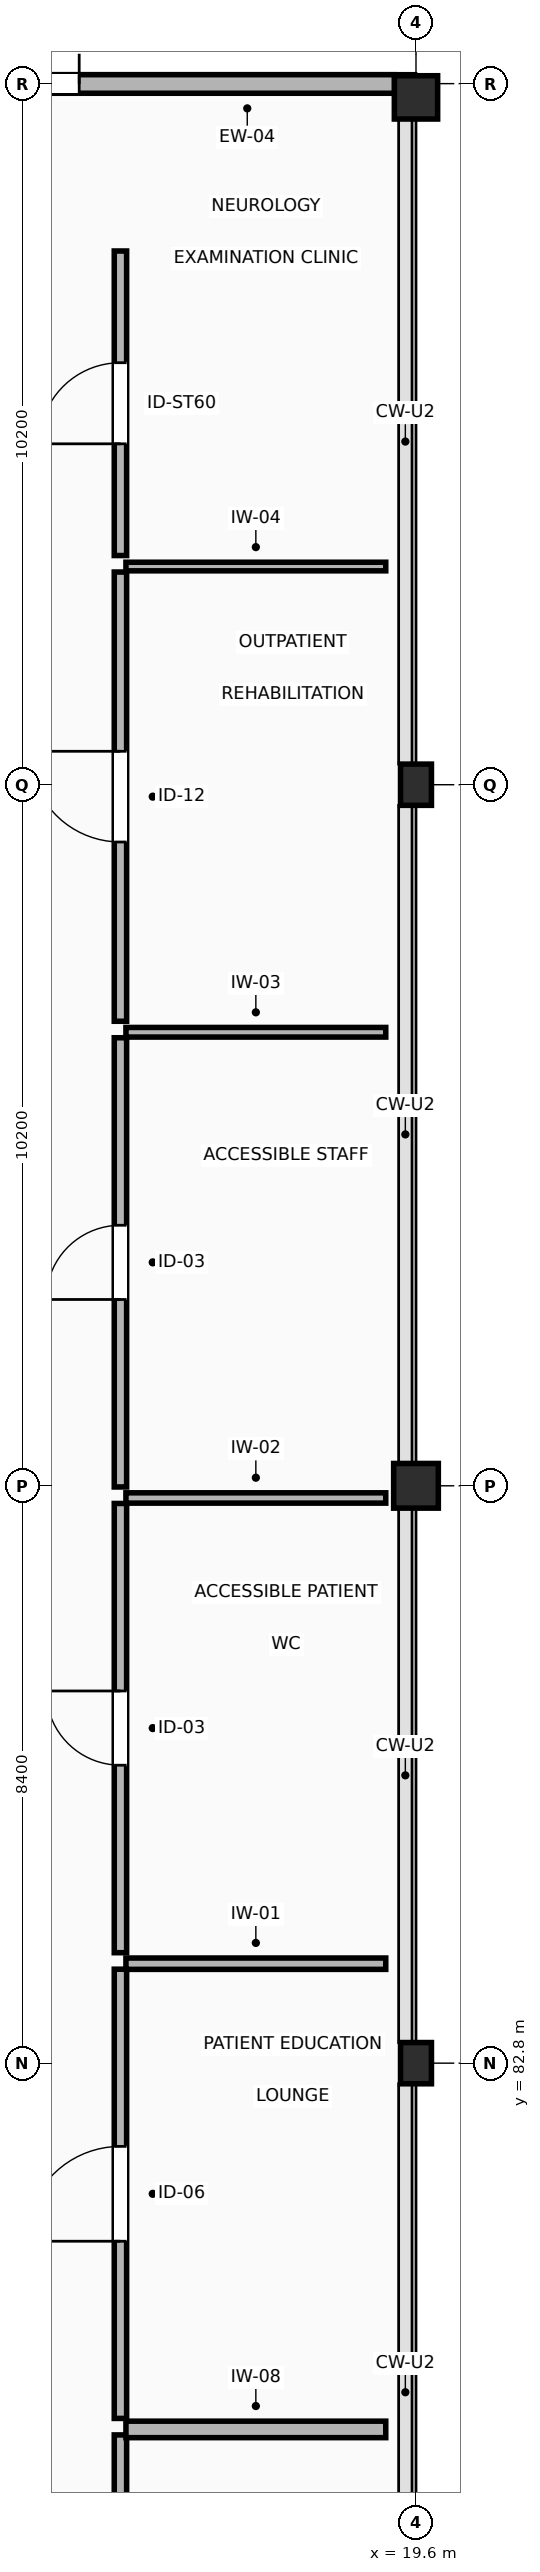
"""IFC4 building model, lengths in metres.
Left out: names, types, materials, properties, quantities, classifications, styles, units other than length and angle.
Written with IfcOpenShell. Run it as: python <this file> out.ifc"""

import sys

from ifc_helpers import new_model, si_unit, direction, frame, frame_2d, origin, origin_2d, place, context, subcontext, project, spatial, rectangle, extrude, element, fill, save


model = new_model("IFC4")
c1 = context("Model", 3, precision=1e-05, world=origin(), true_north=direction((0.0, 1.0)))
c2 = subcontext(c1, "Body", "Model", "MODEL_VIEW")
j1 = project(units=[si_unit("LENGTHUNIT", "METRE"), si_unit("PLANEANGLEUNIT", "RADIAN")], contexts=[c1])
p1 = place(None, origin())
s1 = spatial("IfcSite", under=j1, at=p1, CompositionType="ELEMENT")
p2 = place(p1, origin())
s2 = spatial("IfcBuilding", under=s1, at=p2, CompositionType="ELEMENT")
p3 = place(p2, origin())
s3 = spatial("IfcBuildingStorey", under=s2, at=p3, CompositionType="ELEMENT", Elevation=0.0)
p4 = place(p3, frame((19.6, 82.8, -1.75), z_axis=(0.0, 0.0, 1.0), x_axis=(1.0, 0.0, 0.0)))
e1 = element("IfcColumn", 1, at=p4, inside=s3, PredefinedType="COLUMN", context=c2, shape_type="SweptSolid", body=[
    extrude(rectangle(XDim=0.45, YDim=0.6, at=origin_2d()), origin(), (0.0, 0.0, 1.0), 7.15),
])
p5 = place(p3, frame((19.6, 91.2, -1.75), z_axis=(0.0, 0.0, 1.0), x_axis=(1.0, 0.0, 0.0)))
e2 = element("IfcColumn", 2, at=p5, inside=s3, PredefinedType="COLUMN", context=c2, shape_type="SweptSolid", body=[
    extrude(rectangle(XDim=0.65, YDim=0.65, at=origin_2d()), origin(), (0.0, 0.0, 1.0), 7.15),
])
p6 = place(p3, frame((19.6, 101.4, -1.75), z_axis=(0.0, 0.0, 1.0), x_axis=(1.0, 0.0, 0.0)))
e3 = element("IfcColumn", 3, at=p6, inside=s3, PredefinedType="COLUMN", context=c2, shape_type="SweptSolid", body=[
    extrude(rectangle(XDim=0.45, YDim=0.6, at=origin_2d()), origin(), (0.0, 0.0, 1.0), 7.15),
])
p7 = place(p3, frame((19.6, 111.4, -1.75), z_axis=(0.0, 0.0, 1.0), x_axis=(1.0, 0.0, 0.0)))
e4 = element("IfcColumn", 4, at=p7, inside=s3, PredefinedType="COLUMN", context=c2, shape_type="SweptSolid", body=[
    extrude(rectangle(XDim=0.63, YDim=0.63, at=origin_2d()), origin(), (0.0, 0.0, 1.0), 7.15),
])
p8 = place(p3, frame((19.29, 111.595, 0.0), z_axis=(0.0, 0.0, 1.0), x_axis=(-1.0, 0.0, 0.0)))
e5 = element("IfcWall", 5, at=p8, inside=s3, PredefinedType="STANDARD", context=c2, shape_type="SweptSolid", body=[
    extrude(rectangle(XDim=7.755, YDim=0.27, at=frame_2d((3.877, 0.0))), origin(), (0.0, 0.0, 1.0), 5.05),
])
p9 = place(p8, frame((4.59, 0.0, 0.0)))
e6 = element("IfcOpeningElement", 6, at=p9, cuts=e5, PredefinedType="OPENING", context=c2, shape_type="SweptSolid", body=[
    extrude(rectangle(XDim=2.0, YDim=2.4, at=frame_2d((1.0, 1.2))), frame((0.0, 0.145, 0.0), z_axis=(0.0, -1.0, 0.0), x_axis=(1.0, 0.0, 0.0)), (0.0, 0.0, 1.0), 0.29),
])
p10 = place(p3, frame((15.3, 70.856, 0.0), z_axis=(0.0, 0.0, 1.0), x_axis=(0.0, 1.0, 0.0)))
e7 = element("IfcWall", 7, at=p10, inside=s3, PredefinedType="PARTITIONING", context=c2, shape_type="SweptSolid", body=[
    extrude(rectangle(XDim=6.536, YDim=0.18, at=frame_2d((3.268, 0.0))), origin(), (0.0, 0.0, 1.0), 5.05),
])
p11 = place(p10, frame((2.628, 0.0, 0.0)))
e8 = element("IfcOpeningElement", 8, at=p11, cuts=e7, PredefinedType="OPENING", context=c2, shape_type="SweptSolid", body=[
    extrude(rectangle(XDim=1.28, YDim=2.25, at=frame_2d((0.64, 1.125))), frame((0.0, 0.1, 0.0), z_axis=(0.0, -1.0, 0.0), x_axis=(1.0, 0.0, 0.0)), (0.0, 0.0, 1.0), 0.2),
])
p12 = place(p3, frame((15.38, 77.471, 0.0), z_axis=(0.0, 0.0, 1.0), x_axis=(1.0, 0.0, 0.0)))
e9 = element("IfcWall", 9, at=p12, inside=s3, PredefinedType="PARTITIONING", context=c2, shape_type="SweptSolid", body=[
    extrude(rectangle(XDim=3.78, YDim=0.24, at=frame_2d((1.89, 0.0))), origin(), (0.0, 0.0, 1.0), 5.05),
])
p13 = place(p3, frame((15.3, 77.631, 0.0), z_axis=(0.0, 0.0, 1.0), x_axis=(0.0, 1.0, 0.0)))
e10 = element("IfcWall", 10, at=p13, inside=s3, PredefinedType="PARTITIONING", context=c2, shape_type="SweptSolid", body=[
    extrude(rectangle(XDim=6.536, YDim=0.18, at=frame_2d((3.268, 0.0))), origin(), (0.0, 0.0, 1.0), 5.05),
])
p14 = place(p13, frame((2.578, 0.0, 0.0)))
e11 = element("IfcOpeningElement", 11, at=p14, cuts=e10, PredefinedType="OPENING", context=c2, shape_type="SweptSolid", body=[
    extrude(rectangle(XDim=1.38, YDim=2.25, at=frame_2d((0.69, 1.125))), frame((0.0, 0.1, 0.0), z_axis=(0.0, -1.0, 0.0), x_axis=(1.0, 0.0, 0.0)), (0.0, 0.0, 1.0), 0.2),
])
p15 = place(p3, frame((15.38, 84.247, 0.0), z_axis=(0.0, 0.0, 1.0), x_axis=(1.0, 0.0, 0.0)))
e12 = element("IfcWall", 12, at=p15, inside=s3, PredefinedType="PARTITIONING", context=c2, shape_type="SweptSolid", body=[
    extrude(rectangle(XDim=3.78, YDim=0.165, at=frame_2d((1.89, 0.0))), origin(), (0.0, 0.0, 1.0), 5.05),
])
p16 = place(p3, frame((15.3, 84.407, 0.0), z_axis=(0.0, 0.0, 1.0), x_axis=(0.0, 1.0, 0.0)))
e13 = element("IfcWall", 13, at=p16, inside=s3, PredefinedType="PARTITIONING", context=c2, shape_type="SweptSolid", body=[
    extrude(rectangle(XDim=6.536, YDim=0.18, at=frame_2d((3.268, 0.0))), origin(), (0.0, 0.0, 1.0), 5.05),
])
p17 = place(p16, frame((2.728, 0.0, 0.0)))
e14 = element("IfcOpeningElement", 14, at=p17, cuts=e13, PredefinedType="OPENING", context=c2, shape_type="SweptSolid", body=[
    extrude(rectangle(XDim=1.08, YDim=2.2, at=frame_2d((0.54, 1.1))), frame((0.0, 0.1, 0.0), z_axis=(0.0, -1.0, 0.0), x_axis=(1.0, 0.0, 0.0)), (0.0, 0.0, 1.0), 0.2),
])
p18 = place(p3, frame((15.38, 91.023, 0.0), z_axis=(0.0, 0.0, 1.0), x_axis=(1.0, 0.0, 0.0)))
e15 = element("IfcWall", 15, at=p18, inside=s3, PredefinedType="PARTITIONING", context=c2, shape_type="SweptSolid", body=[
    extrude(rectangle(XDim=3.78, YDim=0.15, at=frame_2d((1.89, 0.0))), origin(), (0.0, 0.0, 1.0), 5.05),
])
p19 = place(p3, frame((15.3, 91.183, 0.0), z_axis=(0.0, 0.0, 1.0), x_axis=(0.0, 1.0, 0.0)))
e16 = element("IfcWall", 16, at=p19, inside=s3, PredefinedType="PARTITIONING", context=c2, shape_type="SweptSolid", body=[
    extrude(rectangle(XDim=6.536, YDim=0.18, at=frame_2d((3.268, 0.0))), origin(), (0.0, 0.0, 1.0), 5.05),
])
p20 = place(p19, frame((2.728, 0.0, 0.0)))
e17 = element("IfcOpeningElement", 17, at=p20, cuts=e16, PredefinedType="OPENING", context=c2, shape_type="SweptSolid", body=[
    extrude(rectangle(XDim=1.08, YDim=2.2, at=frame_2d((0.54, 1.1))), frame((0.0, 0.1, 0.0), z_axis=(0.0, -1.0, 0.0), x_axis=(1.0, 0.0, 0.0)), (0.0, 0.0, 1.0), 0.2),
])
p21 = place(p3, frame((15.38, 97.799, 0.0), z_axis=(0.0, 0.0, 1.0), x_axis=(1.0, 0.0, 0.0)))
e18 = element("IfcWall", 18, at=p21, inside=s3, PredefinedType="PARTITIONING", context=c2, shape_type="SweptSolid", body=[
    extrude(rectangle(XDim=3.78, YDim=0.14, at=frame_2d((1.89, 0.0))), origin(), (0.0, 0.0, 1.0), 5.05),
])
p22 = place(p3, frame((15.3, 97.958, 0.0), z_axis=(0.0, 0.0, 1.0), x_axis=(0.0, 1.0, 0.0)))
e19 = element("IfcWall", 19, at=p22, inside=s3, PredefinedType="PARTITIONING", context=c2, shape_type="SweptSolid", body=[
    extrude(rectangle(XDim=6.536, YDim=0.18, at=frame_2d((3.268, 0.0))), origin(), (0.0, 0.0, 1.0), 5.05),
])
p23 = place(p22, frame((2.608, 0.0, 0.0)))
e20 = element("IfcOpeningElement", 20, at=p23, cuts=e19, PredefinedType="OPENING", context=c2, shape_type="SweptSolid", body=[
    extrude(rectangle(XDim=1.32, YDim=2.22, at=frame_2d((0.66, 1.11))), frame((0.0, 0.1, 0.0), z_axis=(0.0, -1.0, 0.0), x_axis=(1.0, 0.0, 0.0)), (0.0, 0.0, 1.0), 0.2),
])
p24 = place(p3, frame((15.38, 104.574, 0.0), z_axis=(0.0, 0.0, 1.0), x_axis=(1.0, 0.0, 0.0)))
e21 = element("IfcWall", 21, at=p24, inside=s3, PredefinedType="PARTITIONING", context=c2, shape_type="SweptSolid", body=[
    extrude(rectangle(XDim=3.78, YDim=0.125, at=frame_2d((1.89, 0.0))), origin(), (0.0, 0.0, 1.0), 5.05),
])
p25 = place(p3, frame((15.3, 104.734, 0.0), z_axis=(0.0, 0.0, 1.0), x_axis=(0.0, 1.0, 0.0)))
e22 = element("IfcWall", 22, at=p25, inside=s3, PredefinedType="PARTITIONING", context=c2, shape_type="SweptSolid", body=[
    extrude(rectangle(XDim=4.431, YDim=0.18, at=frame_2d((2.215, 0.0))), origin(), (0.0, 0.0, 1.0), 5.05),
])
p26 = place(p25, frame((1.625, 0.0, 0.0)))
e23 = element("IfcOpeningElement", 23, at=p26, cuts=e22, PredefinedType="OPENING", context=c2, shape_type="SweptSolid", body=[
    extrude(rectangle(XDim=1.18, YDim=2.18, at=frame_2d((0.59, 1.09))), frame((0.0, 0.1, 0.0), z_axis=(0.0, -1.0, 0.0), x_axis=(1.0, 0.0, 0.0)), (0.0, 0.0, 1.0), 0.2),
])
p27 = place(p9, frame((2.0, 0.0, 0.0), z_axis=(0.0, 0.0, 1.0), x_axis=(-1.0, 0.0, 0.0)))
e24 = element("IfcDoor", 24, at=p27, inside=s3, OperationType="DOUBLE_DOOR_SINGLE_SWING", PredefinedType="DOOR", context=c2, shape_type="SweptSolid", body=[
    extrude(rectangle(XDim=2.0, YDim=2.4, at=frame_2d((1.0, 1.2))), frame((0.0, 0.025, 0.0), z_axis=(0.0, -1.0, 0.0), x_axis=(1.0, 0.0, 0.0)), (0.0, 0.0, 1.0), 0.05),
])
fill(e6, e24)
p28 = place(p14, origin())
e25 = element("IfcDoor", 25, at=p28, inside=s3, OperationType="SINGLE_SWING_LEFT", PredefinedType="DOOR", context=c2, shape_type="SweptSolid", body=[
    extrude(rectangle(XDim=1.38, YDim=2.25, at=frame_2d((0.69, 1.125))), frame((0.0, 0.025, 0.0), z_axis=(0.0, -1.0, 0.0), x_axis=(1.0, 0.0, 0.0)), (0.0, 0.0, 1.0), 0.05),
])
fill(e11, e25)
p29 = place(p17, origin())
e26 = element("IfcDoor", 26, at=p29, inside=s3, OperationType="SINGLE_SWING_RIGHT", PredefinedType="DOOR", context=c2, shape_type="SweptSolid", body=[
    extrude(rectangle(XDim=1.08, YDim=2.2, at=frame_2d((0.54, 1.1))), frame((0.0, 0.025, 0.0), z_axis=(0.0, -1.0, 0.0), x_axis=(1.0, 0.0, 0.0)), (0.0, 0.0, 1.0), 0.05),
])
fill(e14, e26)
p30 = place(p20, origin())
e27 = element("IfcDoor", 27, at=p30, inside=s3, OperationType="SINGLE_SWING_LEFT", PredefinedType="DOOR", context=c2, shape_type="SweptSolid", body=[
    extrude(rectangle(XDim=1.08, YDim=2.2, at=frame_2d((0.54, 1.1))), frame((0.0, 0.025, 0.0), z_axis=(0.0, -1.0, 0.0), x_axis=(1.0, 0.0, 0.0)), (0.0, 0.0, 1.0), 0.05),
])
fill(e17, e27)
p31 = place(p23, origin())
e28 = element("IfcDoor", 28, at=p31, inside=s3, OperationType="SINGLE_SWING_RIGHT", PredefinedType="DOOR", context=c2, shape_type="SweptSolid", body=[
    extrude(rectangle(XDim=1.32, YDim=2.22, at=frame_2d((0.66, 1.11))), frame((0.0, 0.025, 0.0), z_axis=(0.0, -1.0, 0.0), x_axis=(1.0, 0.0, 0.0)), (0.0, 0.0, 1.0), 0.05),
])
fill(e20, e28)
p32 = place(p26, origin())
e29 = element("IfcDoor", 29, at=p32, inside=s3, OperationType="SINGLE_SWING_LEFT", PredefinedType="DOOR", context=c2, shape_type="SweptSolid", body=[
    extrude(rectangle(XDim=1.18, YDim=2.18, at=frame_2d((0.59, 1.09))), frame((0.0, 0.025, 0.0), z_axis=(0.0, -1.0, 0.0), x_axis=(1.0, 0.0, 0.0)), (0.0, 0.0, 1.0), 0.05),
])
fill(e23, e29)
save(model, sys.argv[1])
